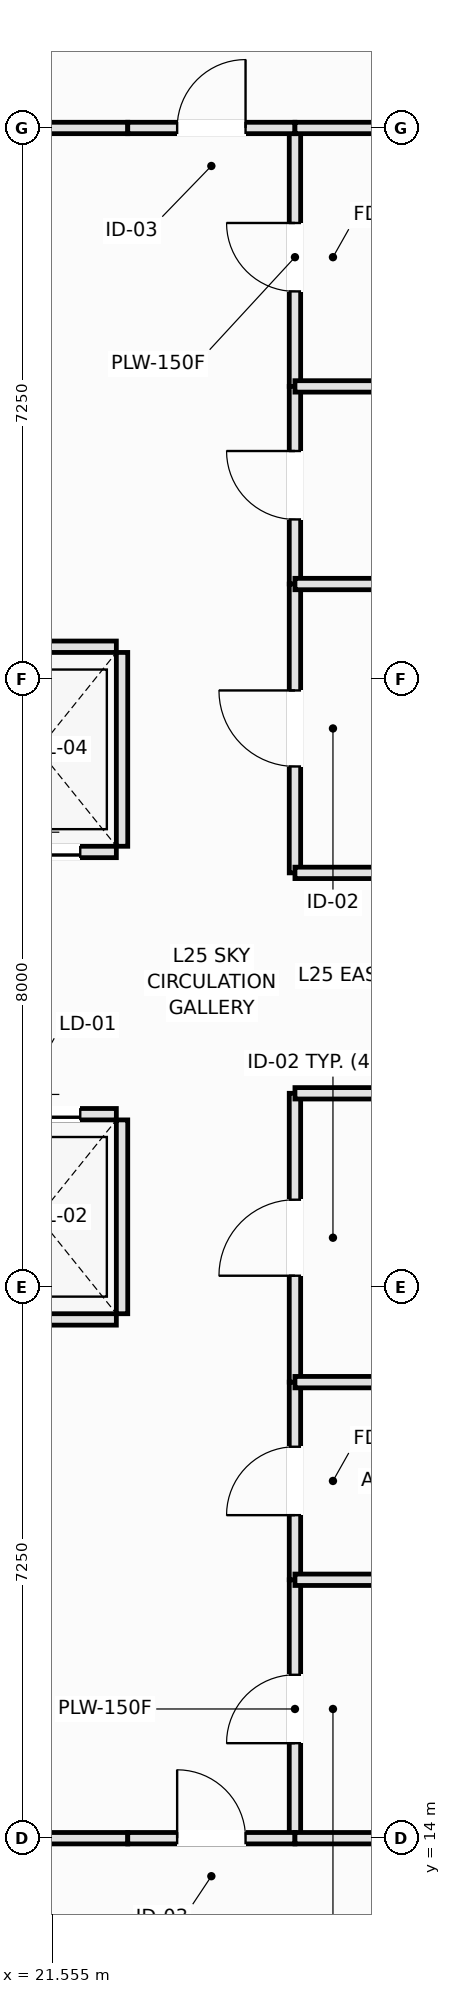
"""IFC4 building model, lengths in metres.
Left out: names, types, materials, properties, quantities, classifications, styles, units other than length and angle.
Written with IfcOpenShell. Run it as: python <this file> out.ifc"""

import sys

from ifc_helpers import new_model, si_unit, direction, frame, frame_2d, origin, place, context, subcontext, project, spatial, rectangle, extrude, element, fill, save


model = new_model("IFC4")
c1 = context("Model", 3, precision=1e-05, world=origin(), true_north=direction((0.0, 1.0)))
c2 = subcontext(c1, "Body", "Model", "MODEL_VIEW")
j1 = project(units=[si_unit("LENGTHUNIT", "METRE"), si_unit("PLANEANGLEUNIT", "RADIAN")], contexts=[c1])
p1 = place(None, origin())
s1 = spatial("IfcSite", under=j1, at=p1, CompositionType="ELEMENT")
p2 = place(p1, origin())
s2 = spatial("IfcBuilding", under=s1, at=p2, CompositionType="ELEMENT")
p3 = place(p2, frame((0.0, 0.0, 97.85)))
s3 = spatial("IfcBuildingStorey", under=s2, at=p3, CompositionType="ELEMENT", Elevation=97.85)
p4 = place(p3, frame((20.35, 20.825, 0.0), z_axis=(0.0, 0.0, 1.0), x_axis=(1.0, 0.0, 0.0)))
e1 = element("IfcWall", 1, at=p4, inside=s3, PredefinedType="PARTITIONING", context=c2, shape_type="SweptSolid", body=[
    extrude(rectangle(XDim=2.05, YDim=0.15, at=frame_2d((1.025, 0.0))), origin(), (0.0, 0.0, 1.0), 4.22),
])
p5 = place(p3, frame((20.35, 23.525, 0.0), z_axis=(0.0, 0.0, 1.0), x_axis=(1.0, 0.0, 0.0)))
e2 = element("IfcWall", 2, at=p5, inside=s3, PredefinedType="PARTITIONING", context=c2, shape_type="SweptSolid", body=[
    extrude(rectangle(XDim=2.05, YDim=0.15, at=frame_2d((1.025, 0.0))), origin(), (0.0, 0.0, 1.0), 4.22),
])
p6 = place(p5, frame((0.475, 0.0, 0.0)))
e3 = element("IfcOpeningElement", 3, at=p6, cuts=e2, PredefinedType="OPENING", context=c2, shape_type="SweptSolid", body=[
    extrude(rectangle(XDim=1.1, YDim=2.2, at=frame_2d((0.55, 1.1))), frame((0.0, 0.085, 0.0), z_axis=(0.0, -1.0, 0.0), x_axis=(1.0, 0.0, 0.0)), (0.0, 0.0, 1.0), 0.17),
])
p7 = place(p3, frame((22.475, 20.9, 0.0), z_axis=(0.0, 0.0, 1.0), x_axis=(0.0, 1.0, 0.0)))
e4 = element("IfcWall", 4, at=p7, inside=s3, PredefinedType="PARTITIONING", context=c2, shape_type="SweptSolid", body=[
    extrude(rectangle(XDim=2.55, YDim=0.15, at=frame_2d((1.275, 0.0))), origin(), (0.0, 0.0, 1.0), 4.22),
])
p8 = place(p3, frame((20.35, 26.975, 0.0), z_axis=(0.0, 0.0, 1.0), x_axis=(1.0, 0.0, 0.0)))
e5 = element("IfcWall", 5, at=p8, inside=s3, PredefinedType="PARTITIONING", context=c2, shape_type="SweptSolid", body=[
    extrude(rectangle(XDim=2.05, YDim=0.15, at=frame_2d((1.025, 0.0))), origin(), (0.0, 0.0, 1.0), 4.22),
])
p9 = place(p8, frame((0.475, 0.0, 0.0)))
e6 = element("IfcOpeningElement", 6, at=p9, cuts=e5, PredefinedType="OPENING", context=c2, shape_type="SweptSolid", body=[
    extrude(rectangle(XDim=1.1, YDim=2.2, at=frame_2d((0.55, 1.1))), frame((0.0, 0.085, 0.0), z_axis=(0.0, -1.0, 0.0), x_axis=(1.0, 0.0, 0.0)), (0.0, 0.0, 1.0), 0.17),
])
p10 = place(p3, frame((20.35, 29.675, 0.0), z_axis=(0.0, 0.0, 1.0), x_axis=(1.0, 0.0, 0.0)))
e7 = element("IfcWall", 7, at=p10, inside=s3, PredefinedType="PARTITIONING", context=c2, shape_type="SweptSolid", body=[
    extrude(rectangle(XDim=2.05, YDim=0.15, at=frame_2d((1.025, 0.0))), origin(), (0.0, 0.0, 1.0), 4.22),
])
p11 = place(p3, frame((22.475, 27.05, 0.0), z_axis=(0.0, 0.0, 1.0), x_axis=(0.0, 1.0, 0.0)))
e8 = element("IfcWall", 8, at=p11, inside=s3, PredefinedType="PARTITIONING", context=c2, shape_type="SweptSolid", body=[
    extrude(rectangle(XDim=2.55, YDim=0.15, at=frame_2d((1.275, 0.0))), origin(), (0.0, 0.0, 1.0), 4.22),
])
for number, where, z_axis, x_axis in (
    (9, (18.0, 14.0, 0.0), (0.0, 0.0, 1.0), (1.0, 0.0, 0.0)),
    (10, (18.0, 36.5, 0.0), (0.0, 0.0, 1.0), (1.0, 0.0, 0.0)),
):
    element("IfcWall", number, at=place(p3, frame(where, z_axis=z_axis, x_axis=x_axis)), inside=s3, PredefinedType="PARTITIONING", context=c2, shape_type="SweptSolid", body=[
        extrude(rectangle(XDim=4.55, YDim=0.15, at=frame_2d((2.275, 0.0))), origin(), (0.0, 0.0, 1.0), 4.22),
    ])
p12 = place(p3, frame((24.75, 14.0, 0.0), z_axis=(0.0, 0.0, 1.0), x_axis=(0.0, 1.0, 0.0)))
e11 = element("IfcWall", 11, at=p12, inside=s3, PredefinedType="PLUMBINGWALL", context=c2, shape_type="SweptSolid", body=[
    extrude(rectangle(XDim=3.4, YDim=0.15, at=frame_2d((1.7, 0.0))), origin(), (0.0, 0.0, 1.0), 4.22),
])
p13 = place(p12, frame((1.25, 0.0, 0.0)))
e12 = element("IfcOpeningElement", 12, at=p13, cuts=e11, PredefinedType="OPENING", context=c2, shape_type="SweptSolid", body=[
    extrude(rectangle(XDim=0.9, YDim=2.1, at=frame_2d((0.45, 1.05))), frame((0.0, 0.085, 0.0), z_axis=(0.0, -1.0, 0.0), x_axis=(1.0, 0.0, 0.0)), (0.0, 0.0, 1.0), 0.17),
])
p14 = place(p3, frame((24.75, 33.1, 0.0), z_axis=(0.0, 0.0, 1.0), x_axis=(0.0, 1.0, 0.0)))
e13 = element("IfcWall", 13, at=p14, inside=s3, PredefinedType="PLUMBINGWALL", context=c2, shape_type="SweptSolid", body=[
    extrude(rectangle(XDim=3.4, YDim=0.15, at=frame_2d((1.7, 0.0))), origin(), (0.0, 0.0, 1.0), 4.22),
])
p15 = place(p14, frame((1.25, 0.0, 0.0)))
e14 = element("IfcOpeningElement", 14, at=p15, cuts=e13, PredefinedType="OPENING", context=c2, shape_type="SweptSolid", body=[
    extrude(rectangle(XDim=0.9, YDim=2.1, at=frame_2d((0.45, 1.05))), frame((0.0, 0.085, 0.0), z_axis=(0.0, -1.0, 0.0), x_axis=(1.0, 0.0, 0.0)), (0.0, 0.0, 1.0), 0.17),
])
p16 = place(p3, frame((24.75, 17.4, 0.0), z_axis=(0.0, 0.0, 1.0), x_axis=(0.0, 1.0, 0.0)))
e15 = element("IfcWall", 15, at=p16, inside=s3, PredefinedType="PLUMBINGWALL", context=c2, shape_type="SweptSolid", body=[
    extrude(rectangle(XDim=2.6, YDim=0.15, at=frame_2d((1.3, 0.0))), origin(), (0.0, 0.0, 1.0), 4.22),
])
p17 = place(p16, frame((0.85, 0.0, 0.0)))
e16 = element("IfcOpeningElement", 16, at=p17, cuts=e15, PredefinedType="OPENING", context=c2, shape_type="SweptSolid", body=[
    extrude(rectangle(XDim=0.9, YDim=2.1, at=frame_2d((0.45, 1.05))), frame((0.0, 0.085, 0.0), z_axis=(0.0, -1.0, 0.0), x_axis=(1.0, 0.0, 0.0)), (0.0, 0.0, 1.0), 0.17),
])
p18 = place(p3, frame((24.75, 30.5, 0.0), z_axis=(0.0, 0.0, 1.0), x_axis=(0.0, 1.0, 0.0)))
e17 = element("IfcWall", 17, at=p18, inside=s3, PredefinedType="PLUMBINGWALL", context=c2, shape_type="SweptSolid", body=[
    extrude(rectangle(XDim=2.6, YDim=0.15, at=frame_2d((1.3, 0.0))), origin(), (0.0, 0.0, 1.0), 4.22),
])
p19 = place(p18, frame((0.85, 0.0, 0.0)))
e18 = element("IfcOpeningElement", 18, at=p19, cuts=e17, PredefinedType="OPENING", context=c2, shape_type="SweptSolid", body=[
    extrude(rectangle(XDim=0.9, YDim=2.1, at=frame_2d((0.45, 1.05))), frame((0.0, 0.085, 0.0), z_axis=(0.0, -1.0, 0.0), x_axis=(1.0, 0.0, 0.0)), (0.0, 0.0, 1.0), 0.17),
])
p20 = place(p3, frame((22.55, 14.0, 0.0), z_axis=(0.0, 0.0, 1.0), x_axis=(1.0, 0.0, 0.0)))
e19 = element("IfcWall", 19, at=p20, inside=s3, PredefinedType="PARTITIONING", context=c2, shape_type="SweptSolid", body=[
    extrude(rectangle(XDim=2.2, YDim=0.15, at=frame_2d((1.1, 0.0))), origin(), (0.0, 0.0, 1.0), 4.22),
])
p21 = place(p20, frame((0.65, 0.0, 0.0)))
e20 = element("IfcOpeningElement", 20, at=p21, cuts=e19, PredefinedType="OPENING", context=c2, shape_type="SweptSolid", body=[
    extrude(rectangle(XDim=0.9, YDim=2.1, at=frame_2d((0.45, 1.05))), frame((0.0, 0.085, 0.0), z_axis=(0.0, -1.0, 0.0), x_axis=(1.0, 0.0, 0.0)), (0.0, 0.0, 1.0), 0.17),
])
p22 = place(p3, frame((22.55, 36.5, 0.0), z_axis=(0.0, 0.0, 1.0), x_axis=(1.0, 0.0, 0.0)))
e21 = element("IfcWall", 21, at=p22, inside=s3, PredefinedType="PARTITIONING", context=c2, shape_type="SweptSolid", body=[
    extrude(rectangle(XDim=2.2, YDim=0.15, at=frame_2d((1.1, 0.0))), origin(), (0.0, 0.0, 1.0), 4.22),
])
p23 = place(p22, frame((0.65, 0.0, 0.0)))
e22 = element("IfcOpeningElement", 22, at=p23, cuts=e21, PredefinedType="OPENING", context=c2, shape_type="SweptSolid", body=[
    extrude(rectangle(XDim=0.9, YDim=2.1, at=frame_2d((0.45, 1.05))), frame((0.0, 0.085, 0.0), z_axis=(0.0, -1.0, 0.0), x_axis=(1.0, 0.0, 0.0)), (0.0, 0.0, 1.0), 0.17),
])
p24 = place(p3, frame((24.75, 20.0, 0.0), z_axis=(0.0, 0.0, 1.0), x_axis=(0.0, 1.0, 0.0)))
e23 = element("IfcWall", 23, at=p24, inside=s3, PredefinedType="PARTITIONING", context=c2, shape_type="SweptSolid", body=[
    extrude(rectangle(XDim=3.8, YDim=0.15, at=frame_2d((1.9, 0.0))), origin(), (0.0, 0.0, 1.0), 4.22),
])
p25 = place(p24, frame((1.4, 0.0, 0.0)))
e24 = element("IfcOpeningElement", 24, at=p25, cuts=e23, PredefinedType="OPENING", context=c2, shape_type="SweptSolid", body=[
    extrude(rectangle(XDim=1.0, YDim=2.15, at=frame_2d((0.5, 1.075))), frame((0.0, 0.085, 0.0), z_axis=(0.0, -1.0, 0.0), x_axis=(1.0, 0.0, 0.0)), (0.0, 0.0, 1.0), 0.17),
])
p26 = place(p3, frame((24.75, 26.7, 0.0), z_axis=(0.0, 0.0, 1.0), x_axis=(0.0, 1.0, 0.0)))
e25 = element("IfcWall", 25, at=p26, inside=s3, PredefinedType="PARTITIONING", context=c2, shape_type="SweptSolid", body=[
    extrude(rectangle(XDim=3.8, YDim=0.15, at=frame_2d((1.9, 0.0))), origin(), (0.0, 0.0, 1.0), 4.22),
])
p27 = place(p26, frame((1.4, 0.0, 0.0)))
e26 = element("IfcOpeningElement", 26, at=p27, cuts=e25, PredefinedType="OPENING", context=c2, shape_type="SweptSolid", body=[
    extrude(rectangle(XDim=1.0, YDim=2.15, at=frame_2d((0.5, 1.075))), frame((0.0, 0.085, 0.0), z_axis=(0.0, -1.0, 0.0), x_axis=(1.0, 0.0, 0.0)), (0.0, 0.0, 1.0), 0.17),
])
for number, where, z_axis, x_axis in (
    (27, (24.75, 23.8, 0.0), (0.0, 0.0, 1.0), (1.0, 0.0, 0.0)),
    (28, (24.75, 26.7, 0.0), (0.0, 0.0, 1.0), (1.0, 0.0, 0.0)),
):
    element("IfcWall", number, at=place(p3, frame(where, z_axis=z_axis, x_axis=x_axis)), inside=s3, PredefinedType="PARTITIONING", context=c2, shape_type="SweptSolid", body=[
        extrude(rectangle(XDim=3.8, YDim=0.15, at=frame_2d((1.9, 0.0))), origin(), (0.0, 0.0, 1.0), 4.22),
    ])
for number, where, z_axis, x_axis in (
    (29, (24.75, 17.4, 0.0), (0.0, 0.0, 1.0), (1.0, 0.0, 0.0)),
    (30, (24.75, 14.0, 0.0), (0.0, 0.0, 1.0), (1.0, 0.0, 0.0)),
    (31, (24.75, 33.1, 0.0), (0.0, 0.0, 1.0), (1.0, 0.0, 0.0)),
    (32, (24.75, 36.5, 0.0), (0.0, 0.0, 1.0), (1.0, 0.0, 0.0)),
    (33, (24.75, 20.0, 0.0), (0.0, 0.0, 1.0), (1.0, 0.0, 0.0)),
    (34, (24.75, 30.5, 0.0), (0.0, 0.0, 1.0), (1.0, 0.0, 0.0)),
):
    element("IfcWall", number, at=place(p3, frame(where, z_axis=z_axis, x_axis=x_axis)), inside=s3, PredefinedType="PLUMBINGWALL", context=c2, shape_type="SweptSolid", body=[
        extrude(rectangle(XDim=3.8, YDim=0.15, at=frame_2d((1.9, 0.0))), origin(), (0.0, 0.0, 1.0), 4.22),
    ])
p28 = place(p6, origin())
e35 = element("IfcDoor", 35, at=p28, inside=s3, OperationType="DOUBLE_DOOR_SLIDING", PredefinedType="DOOR", context=c2, shape_type="SweptSolid", body=[
    extrude(rectangle(XDim=1.1, YDim=2.2, at=frame_2d((0.55, 1.1))), frame((0.0, 0.025, 0.0), z_axis=(0.0, -1.0, 0.0), x_axis=(1.0, 0.0, 0.0)), (0.0, 0.0, 1.0), 0.05),
])
fill(e3, e35)
p29 = place(p9, origin())
e36 = element("IfcDoor", 36, at=p29, inside=s3, OperationType="DOUBLE_DOOR_SLIDING", PredefinedType="DOOR", context=c2, shape_type="SweptSolid", body=[
    extrude(rectangle(XDim=1.1, YDim=2.2, at=frame_2d((0.55, 1.1))), frame((0.0, 0.025, 0.0), z_axis=(0.0, -1.0, 0.0), x_axis=(1.0, 0.0, 0.0)), (0.0, 0.0, 1.0), 0.05),
])
fill(e6, e36)
p30 = place(p13, origin())
e37 = element("IfcDoor", 37, at=p30, inside=s3, OperationType="SINGLE_SWING_LEFT", PredefinedType="DOOR", context=c2, shape_type="SweptSolid", body=[
    extrude(rectangle(XDim=0.9, YDim=2.1, at=frame_2d((0.45, 1.05))), frame((0.0, 0.025, 0.0), z_axis=(0.0, -1.0, 0.0), x_axis=(1.0, 0.0, 0.0)), (0.0, 0.0, 1.0), 0.05),
])
fill(e12, e37)
p31 = place(p15, origin())
e38 = element("IfcDoor", 38, at=p31, inside=s3, OperationType="SINGLE_SWING_RIGHT", PredefinedType="DOOR", context=c2, shape_type="SweptSolid", body=[
    extrude(rectangle(XDim=0.9, YDim=2.1, at=frame_2d((0.45, 1.05))), frame((0.0, 0.025, 0.0), z_axis=(0.0, -1.0, 0.0), x_axis=(1.0, 0.0, 0.0)), (0.0, 0.0, 1.0), 0.05),
])
fill(e14, e38)
p32 = place(p17, origin())
e39 = element("IfcDoor", 39, at=p32, inside=s3, OperationType="SINGLE_SWING_LEFT", PredefinedType="DOOR", context=c2, shape_type="SweptSolid", body=[
    extrude(rectangle(XDim=0.9, YDim=2.1, at=frame_2d((0.45, 1.05))), frame((0.0, 0.025, 0.0), z_axis=(0.0, -1.0, 0.0), x_axis=(1.0, 0.0, 0.0)), (0.0, 0.0, 1.0), 0.05),
])
fill(e16, e39)
p33 = place(p19, origin())
e40 = element("IfcDoor", 40, at=p33, inside=s3, OperationType="SINGLE_SWING_RIGHT", PredefinedType="DOOR", context=c2, shape_type="SweptSolid", body=[
    extrude(rectangle(XDim=0.9, YDim=2.1, at=frame_2d((0.45, 1.05))), frame((0.0, 0.025, 0.0), z_axis=(0.0, -1.0, 0.0), x_axis=(1.0, 0.0, 0.0)), (0.0, 0.0, 1.0), 0.05),
])
fill(e18, e40)
p34 = place(p21, origin())
e41 = element("IfcDoor", 41, at=p34, inside=s3, OperationType="SINGLE_SWING_LEFT", PredefinedType="DOOR", context=c2, shape_type="SweptSolid", body=[
    extrude(rectangle(XDim=0.9, YDim=2.1, at=frame_2d((0.45, 1.05))), frame((0.0, 0.025, 0.0), z_axis=(0.0, -1.0, 0.0), x_axis=(1.0, 0.0, 0.0)), (0.0, 0.0, 1.0), 0.05),
])
fill(e20, e41)
p35 = place(p23, origin())
e42 = element("IfcDoor", 42, at=p35, inside=s3, OperationType="SINGLE_SWING_RIGHT", PredefinedType="DOOR", context=c2, shape_type="SweptSolid", body=[
    extrude(rectangle(XDim=0.9, YDim=2.1, at=frame_2d((0.45, 1.05))), frame((0.0, 0.025, 0.0), z_axis=(0.0, -1.0, 0.0), x_axis=(1.0, 0.0, 0.0)), (0.0, 0.0, 1.0), 0.05),
])
fill(e22, e42)
p36 = place(p25, origin())
e43 = element("IfcDoor", 43, at=p36, inside=s3, OperationType="SINGLE_SWING_LEFT", PredefinedType="DOOR", context=c2, shape_type="SweptSolid", body=[
    extrude(rectangle(XDim=1.0, YDim=2.15, at=frame_2d((0.5, 1.075))), frame((0.0, 0.025, 0.0), z_axis=(0.0, -1.0, 0.0), x_axis=(1.0, 0.0, 0.0)), (0.0, 0.0, 1.0), 0.05),
])
fill(e24, e43)
p37 = place(p27, origin())
e44 = element("IfcDoor", 44, at=p37, inside=s3, OperationType="SINGLE_SWING_RIGHT", PredefinedType="DOOR", context=c2, shape_type="SweptSolid", body=[
    extrude(rectangle(XDim=1.0, YDim=2.15, at=frame_2d((0.5, 1.075))), frame((0.0, 0.025, 0.0), z_axis=(0.0, -1.0, 0.0), x_axis=(1.0, 0.0, 0.0)), (0.0, 0.0, 1.0), 0.05),
])
fill(e26, e44)
save(model, sys.argv[1])
